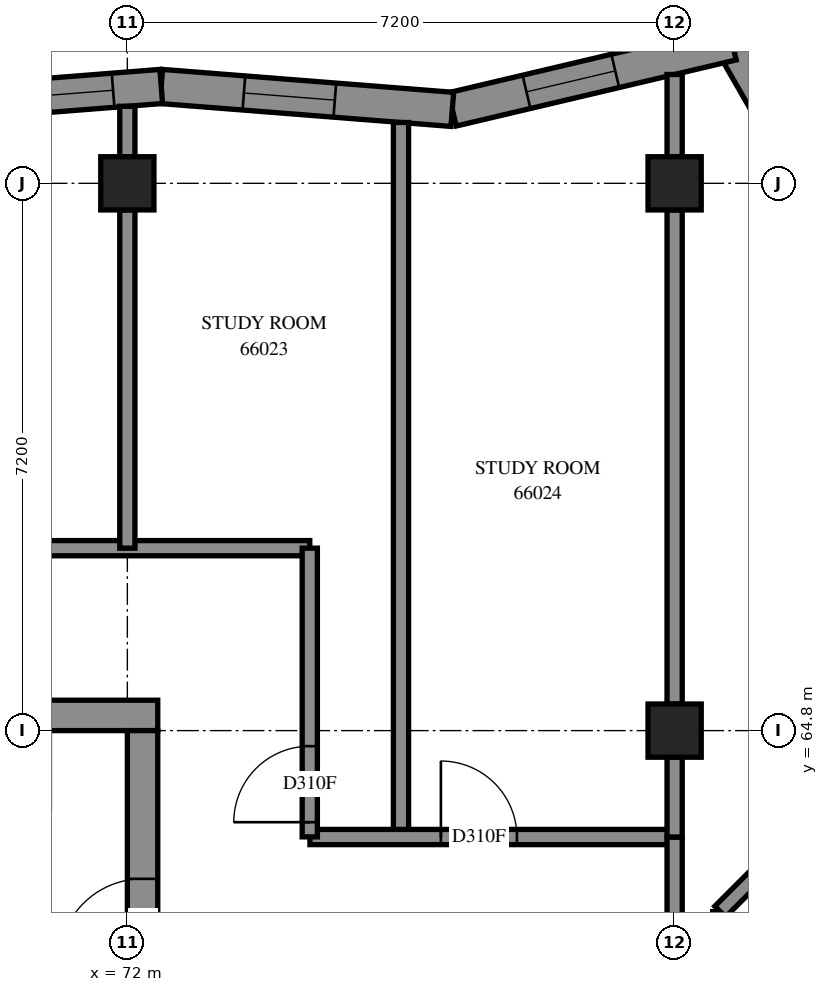
"""IFC4 building model, lengths in metres.
Left out: names, types, materials, properties, quantities, classifications, styles, units other than length and angle.
Written with IfcOpenShell. Run it as: python <this file> out.ifc"""

import sys

from ifc_helpers import new_model, si_unit, direction, frame, frame_2d, origin, origin_2d, place, context, subcontext, project, spatial, polyline, rectangle, outline, extrude, element, fill, save


model = new_model("IFC4")
c1 = context("Model", 3, precision=1e-05, world=origin(), true_north=direction((0.0, 1.0)))
c2 = subcontext(c1, "Body", "Model", "MODEL_VIEW")
j1 = project(units=[si_unit("LENGTHUNIT", "METRE"), si_unit("PLANEANGLEUNIT", "RADIAN")], contexts=[c1])
p1 = place(None, origin())
s1 = spatial("IfcSite", under=j1, at=p1, CompositionType="ELEMENT")
p2 = place(p1, origin())
s2 = spatial("IfcBuilding", under=s1, at=p2, CompositionType="ELEMENT")
p3 = place(p2, frame((0.0, 0.0, 243.8)))
s3 = spatial("IfcBuildingStorey", under=s2, at=p3, CompositionType="ELEMENT", Elevation=243.8)
for number, where, z_axis, x_axis in (
    (1, (72.0, 72.0, 0.0), (0.0, 0.0, 1.0), (1.0, 0.0, 0.0)),
    (2, (79.2, 64.8, 0.0), (0.0, 0.0, 1.0), (1.0, 0.0, 0.0)),
    (3, (79.2, 72.0, 0.0), (0.0, 0.0, 1.0), (1.0, 0.0, 0.0)),
):
    element("IfcColumn", number, at=place(p3, frame(where, z_axis=z_axis, x_axis=x_axis)), inside=s3, PredefinedType="COLUMN", context=c2, shape_type="SweptSolid", body=[
        extrude(rectangle(XDim=0.7, YDim=0.7, at=origin_2d()), origin(), (0.0, 0.0, 1.0), 3.1),
    ])
p4 = place(p3, frame((57.2, 65.0, -0.3), z_axis=(0.0, 0.0, 1.0), x_axis=(1.0, 0.0, 0.0)))
e4 = element("IfcWall", 4, at=p4, inside=s3, PredefinedType="SHEAR", context=c2, shape_type="SweptSolid", body=[
    extrude(rectangle(XDim=15.2, YDim=0.4, at=frame_2d((7.6, 0.0))), origin(), (0.0, 0.0, 1.0), 2.7),
])
p5 = place(p4, frame((10.4, 0.0, 0.3)))
e5 = element("IfcOpeningElement", 5, at=p5, cuts=e4, PredefinedType="OPENING", context=c2, shape_type="SweptSolid", body=[
    extrude(rectangle(XDim=0.8, YDim=2.1, at=frame_2d((0.4, 1.05))), frame((0.0, 0.21, 0.0), z_axis=(0.0, -1.0, 0.0), x_axis=(1.0, 0.0, 0.0)), (0.0, 0.0, 1.0), 0.42),
])
p6 = place(p3, frame((72.2, 50.4, -0.3), z_axis=(0.0, 0.0, 1.0), x_axis=(0.0, 1.0, 0.0)))
e6 = element("IfcWall", 6, at=p6, inside=s3, PredefinedType="SHEAR", context=c2, shape_type="SweptSolid", body=[
    extrude(rectangle(XDim=14.4, YDim=0.4, at=frame_2d((7.2, 0.0))), origin(), (0.0, 0.0, 1.0), 2.7),
])
p7 = place(p6, frame((4.55, 0.0, 0.3)))
e7 = element("IfcOpeningElement", 7, at=p7, cuts=e6, PredefinedType="OPENING", context=c2, shape_type="SweptSolid", body=[
    extrude(rectangle(XDim=1.1, YDim=2.1, at=frame_2d((0.55, 1.05))), frame((0.0, 0.21, 0.0), z_axis=(0.0, -1.0, 0.0), x_axis=(1.0, 0.0, 0.0)), (0.0, 0.0, 1.0), 0.42),
])
p8 = place(p6, frame((11.35, 0.0, 0.3)))
e8 = element("IfcOpeningElement", 8, at=p8, cuts=e6, PredefinedType="OPENING", context=c2, shape_type="SweptSolid", body=[
    extrude(rectangle(XDim=1.1, YDim=2.1, at=frame_2d((0.55, 1.05))), frame((0.0, 0.21, 0.0), z_axis=(0.0, -1.0, 0.0), x_axis=(1.0, 0.0, 0.0)), (0.0, 0.0, 1.0), 0.42),
])
p9 = place(p3, frame((81.611, 70.964, 0.0), z_axis=(0.0, 0.0, 1.0), x_axis=(-0.4979094823, 0.8672290052, 0.0)))
e9 = element("IfcWall", 9, at=p9, inside=s3, PredefinedType="SOLIDWALL", context=c2, shape_type="SweptSolid", body=[
    extrude(outline(polyline([(0.04, -0.225), (3.487, -0.225), (3.151, 0.225), (-0.04, 0.225), (0.04, -0.225)])), origin(), (0.0, 0.0, 1.0), 3.1),
])
p10 = place(p9, frame((0.762, 0.0, 0.45)))
e10 = element("IfcOpeningElement", 10, at=p10, cuts=e9, PredefinedType="OPENING", context=c2, shape_type="SweptSolid", body=[
    extrude(rectangle(XDim=1.2, YDim=2.55, at=frame_2d((0.6, 1.275))), frame((0.0, 0.235, 0.0), z_axis=(0.0, -1.0, 0.0), x_axis=(1.0, 0.0, 0.0)), (0.0, 0.0, 1.0), 0.47),
])
p11 = place(p3, frame((79.958, 73.843, 0.0), z_axis=(0.0, 0.0, 1.0), x_axis=(-0.973240833, -0.2297874693, 0.0)))
e11 = element("IfcWall", 11, at=p11, inside=s3, PredefinedType="SOLIDWALL", context=c2, shape_type="SweptSolid", body=[
    extrude(outline(polyline([(-0.168, -0.225), (3.749, -0.225), (3.82, 0.225), (0.168, 0.225), (-0.168, -0.225)])), origin(), (0.0, 0.0, 1.0), 3.1),
])
p12 = place(p11, frame((1.582, 0.0, 0.45)))
e12 = element("IfcOpeningElement", 12, at=p12, cuts=e11, PredefinedType="OPENING", context=c2, shape_type="SweptSolid", body=[
    extrude(rectangle(XDim=1.2, YDim=2.55, at=frame_2d((0.6, 1.275))), frame((0.0, 0.235, 0.0), z_axis=(0.0, -1.0, 0.0), x_axis=(1.0, 0.0, 0.0)), (0.0, 0.0, 1.0), 0.47),
])
p13 = place(p3, frame((76.275, 72.973, 0.0), z_axis=(0.0, 0.0, 1.0), x_axis=(-0.9969172534, 0.078460116, 0.0)))
e13 = element("IfcWall", 13, at=p13, inside=s3, PredefinedType="SOLIDWALL", context=c2, shape_type="SweptSolid", body=[
    extrude(outline(polyline([(0.035, -0.225), (3.859, -0.225), (3.824, 0.225), (-0.035, 0.225), (0.035, -0.225)])), origin(), (0.0, 0.0, 1.0), 3.1),
])
p14 = place(p13, frame((1.55, 0.0, 0.45)))
e14 = element("IfcOpeningElement", 14, at=p14, cuts=e13, PredefinedType="OPENING", context=c2, shape_type="SweptSolid", body=[
    extrude(rectangle(XDim=1.2, YDim=2.55, at=frame_2d((0.6, 1.275))), frame((0.0, 0.235, 0.0), z_axis=(0.0, -1.0, 0.0), x_axis=(1.0, 0.0, 0.0)), (0.0, 0.0, 1.0), 0.47),
])
p15 = place(p3, frame((72.446, 73.274, 0.0), z_axis=(0.0, 0.0, 1.0), x_axis=(-0.9969177178, -0.0784542156, 0.0)))
e15 = element("IfcWall", 15, at=p15, inside=s3, PredefinedType="SOLIDWALL", context=c2, shape_type="SweptSolid", body=[
    extrude(outline(polyline([(-0.018, -0.225), (3.806, -0.225), (3.842, 0.225), (0.018, 0.225), (-0.018, -0.225)])), origin(), (0.0, 0.0, 1.0), 3.1),
])
p16 = place(p15, frame((0.635, 0.0, 0.45)))
e16 = element("IfcOpeningElement", 16, at=p16, cuts=e15, PredefinedType="OPENING", context=c2, shape_type="SweptSolid", body=[
    extrude(rectangle(XDim=2.8, YDim=2.55, at=frame_2d((1.4, 1.275))), frame((0.0, 0.235, 0.0), z_axis=(0.0, -1.0, 0.0), x_axis=(1.0, 0.0, 0.0)), (0.0, 0.0, 1.0), 0.47),
])
p17 = place(p3, frame((55.2, 67.2, 0.0), z_axis=(0.0, 0.0, 1.0), x_axis=(1.0, 0.0, 0.0)))
e17 = element("IfcWall", 17, at=p17, inside=s3, PredefinedType="PARTITIONING", context=c2, shape_type="SweptSolid", body=[
    extrude(rectangle(XDim=19.2, YDim=0.2, at=frame_2d((9.6, 0.0))), origin(), (0.0, 0.0, 1.0), 3.1),
])
p18 = place(p17, frame((6.149, 0.0, 0.0)))
e18 = element("IfcOpeningElement", 18, at=p18, cuts=e17, PredefinedType="OPENING", context=c2, shape_type="SweptSolid", body=[
    extrude(rectangle(XDim=0.9, YDim=2.1, at=frame_2d((0.45, 1.05))), frame((0.0, 0.11, 0.0), z_axis=(0.0, -1.0, 0.0), x_axis=(1.0, 0.0, 0.0)), (0.0, 0.0, 1.0), 0.22),
])
p19 = place(p17, frame((13.499, 0.0, 0.0)))
e19 = element("IfcOpeningElement", 19, at=p19, cuts=e17, PredefinedType="OPENING", context=c2, shape_type="SweptSolid", body=[
    extrude(rectangle(XDim=0.9, YDim=2.1, at=frame_2d((0.45, 1.05))), frame((0.0, 0.11, 0.0), z_axis=(0.0, -1.0, 0.0), x_axis=(1.0, 0.0, 0.0)), (0.0, 0.0, 1.0), 0.22),
])
p20 = place(p3, frame((79.907, 55.739, 0.0), z_axis=(0.0, 0.0, 1.0), x_axis=(0.7071067812, 0.7071067812, 0.0)))
e20 = element("IfcWall", 20, at=p20, inside=s3, PredefinedType="PARTITIONING", context=c2, shape_type="SweptSolid", body=[
    extrude(rectangle(XDim=9.798, YDim=0.2, at=frame_2d((4.899, 0.0))), origin(), (0.0, 0.0, 1.0), 3.1),
])
p21 = place(p20, frame((0.616, 0.0, 0.0)))
e21 = element("IfcOpeningElement", 21, at=p21, cuts=e20, PredefinedType="OPENING", context=c2, shape_type="SweptSolid", body=[
    extrude(rectangle(XDim=1.0, YDim=2.1, at=frame_2d((0.5, 1.05))), frame((0.0, 0.11, 0.0), z_axis=(0.0, -1.0, 0.0), x_axis=(1.0, 0.0, 0.0)), (0.0, 0.0, 1.0), 0.22),
])
p22 = place(p3, frame((75.6, 63.4, 0.0), z_axis=(0.0, 0.0, 1.0), x_axis=(0.0, 1.0, 0.0)))
e22 = element("IfcWall", 22, at=p22, inside=s3, PredefinedType="PARTITIONING", context=c2, shape_type="SweptSolid", body=[
    extrude(rectangle(XDim=9.4, YDim=0.2, at=frame_2d((4.7, 0.0))), origin(), (0.0, 0.0, 1.0), 3.1),
])
p23 = place(p3, frame((79.2, 65.15, 0.0), z_axis=(0.0, 0.0, 1.0), x_axis=(0.0, 1.0, 0.0)))
e23 = element("IfcWall", 23, at=p23, inside=s3, PredefinedType="PARTITIONING", context=c2, shape_type="SweptSolid", body=[
    extrude(rectangle(XDim=6.5, YDim=0.2, at=frame_2d((3.25, 0.0))), origin(), (0.0, 0.0, 1.0), 3.1),
])
p24 = place(p3, frame((79.799, 62.419, 0.0), z_axis=(0.0, 0.0, 1.0), x_axis=(0.7071067812, 0.7071067812, 0.0)))
e24 = element("IfcWall", 24, at=p24, inside=s3, PredefinedType="PARTITIONING", context=c2, shape_type="SweptSolid", body=[
    extrude(rectangle(XDim=5.858, YDim=0.2, at=frame_2d((2.929, 0.0))), origin(), (0.0, 0.0, 1.0), 3.1),
])
p25 = place(p3, frame((74.402, 63.4, 0.0), z_axis=(0.0, 0.0, 1.0), x_axis=(1.0, 0.0, 0.0)))
e25 = element("IfcWall", 25, at=p25, inside=s3, PredefinedType="PARTITIONING", context=c2, shape_type="SweptSolid", body=[
    extrude(rectangle(XDim=4.798, YDim=0.2, at=frame_2d((2.399, 0.0))), origin(), (0.0, 0.0, 1.0), 3.1),
])
p26 = place(p25, frame((1.723, 0.0, 0.0)))
e26 = element("IfcOpeningElement", 26, at=p26, cuts=e25, PredefinedType="OPENING", context=c2, shape_type="SweptSolid", body=[
    extrude(rectangle(XDim=1.0, YDim=2.1, at=frame_2d((0.5, 1.05))), frame((0.0, 0.11, 0.0), z_axis=(0.0, -1.0, 0.0), x_axis=(1.0, 0.0, 0.0)), (0.0, 0.0, 1.0), 0.22),
])
p27 = place(p3, frame((72.0, 67.2, 0.0), z_axis=(0.0, 0.0, 1.0), x_axis=(0.0, 1.0, 0.0)))
e27 = element("IfcWall", 27, at=p27, inside=s3, PredefinedType="PARTITIONING", context=c2, shape_type="SweptSolid", body=[
    extrude(rectangle(XDim=4.45, YDim=0.2, at=frame_2d((2.225, 0.0))), origin(), (0.0, 0.0, 1.0), 3.1),
])
p28 = place(p3, frame((74.4, 63.402, 0.0), z_axis=(0.0, 0.0, 1.0), x_axis=(0.0, 1.0, 0.0)))
e28 = element("IfcWall", 28, at=p28, inside=s3, PredefinedType="PARTITIONING", context=c2, shape_type="SweptSolid", body=[
    extrude(rectangle(XDim=3.798, YDim=0.2, at=frame_2d((1.899, 0.0))), origin(), (0.0, 0.0, 1.0), 3.1),
])
p29 = place(p28, frame((0.193, 0.0, 0.0)))
e29 = element("IfcOpeningElement", 29, at=p29, cuts=e28, PredefinedType="OPENING", context=c2, shape_type="SweptSolid", body=[
    extrude(rectangle(XDim=1.0, YDim=2.1, at=frame_2d((0.5, 1.05))), frame((0.0, 0.11, 0.0), z_axis=(0.0, -1.0, 0.0), x_axis=(1.0, 0.0, 0.0)), (0.0, 0.0, 1.0), 0.22),
])
p30 = place(p3, frame((79.2, 61.4, 0.0), z_axis=(0.0, 0.0, 1.0), x_axis=(0.0, 1.0, 0.0)))
e30 = element("IfcWall", 30, at=p30, inside=s3, PredefinedType="PARTITIONING", context=c2, shape_type="SweptSolid", body=[
    extrude(rectangle(XDim=2.0, YDim=0.2, at=frame_2d((1.0, 0.0))), origin(), (0.0, 0.0, 1.0), 3.1),
])
p31 = place(p3, frame((79.2, 63.4, 0.0), z_axis=(0.0, 0.0, 1.0), x_axis=(0.0, 1.0, 0.0)))
e31 = element("IfcWall", 31, at=p31, inside=s3, PredefinedType="PARTITIONING", context=c2, shape_type="SweptSolid", body=[
    extrude(rectangle(XDim=1.05, YDim=0.2, at=frame_2d((0.525, 0.0))), origin(), (0.0, 0.0, 1.0), 3.1),
])
p32 = place(p3, frame((79.2, 72.35, 0.0), z_axis=(0.0, 0.0, 1.0), x_axis=(0.0, 1.0, 0.0)))
e32 = element("IfcWall", 32, at=p32, inside=s3, PredefinedType="PARTITIONING", context=c2, shape_type="SweptSolid", body=[
    extrude(rectangle(XDim=1.082, YDim=0.2, at=frame_2d((0.541, 0.0))), origin(), (0.0, 0.0, 1.0), 3.1),
])
p33 = place(p3, frame((72.0, 72.35, 0.0), z_axis=(0.0, 0.0, 1.0), x_axis=(0.0, 1.0, 0.0)))
e33 = element("IfcWall", 33, at=p33, inside=s3, PredefinedType="PARTITIONING", context=c2, shape_type="SweptSolid", body=[
    extrude(rectangle(XDim=0.663, YDim=0.2, at=frame_2d((0.332, 0.0))), origin(), (0.0, 0.0, 1.0), 3.1),
])
p34 = place(p12, origin())
e34 = element("IfcWindow", 34, at=p34, inside=s3, PartitioningType="SINGLE_PANEL", PredefinedType="WINDOW", context=c2, shape_type="SweptSolid", body=[
    extrude(rectangle(XDim=1.2, YDim=2.55, at=frame_2d((0.6, 1.275))), frame((0.0, 0.205, 0.0), z_axis=(0.0, -1.0, 0.0), x_axis=(1.0, 0.0, 0.0)), (0.0, 0.0, 1.0), 0.06),
])
fill(e12, e34)
p35 = place(p14, origin())
e35 = element("IfcWindow", 35, at=p35, inside=s3, PartitioningType="SINGLE_PANEL", PredefinedType="WINDOW", context=c2, shape_type="SweptSolid", body=[
    extrude(rectangle(XDim=1.2, YDim=2.55, at=frame_2d((0.6, 1.275))), frame((0.0, 0.205, 0.0), z_axis=(0.0, -1.0, 0.0), x_axis=(1.0, 0.0, 0.0)), (0.0, 0.0, 1.0), 0.06),
])
fill(e14, e35)
p36 = place(p16, origin())
e36 = element("IfcWindow", 36, at=p36, inside=s3, PartitioningType="SINGLE_PANEL", PredefinedType="WINDOW", context=c2, shape_type="SweptSolid", body=[
    extrude(rectangle(XDim=2.8, YDim=2.55, at=frame_2d((1.4, 1.275))), frame((0.0, 0.205, 0.0), z_axis=(0.0, -1.0, 0.0), x_axis=(1.0, 0.0, 0.0)), (0.0, 0.0, 1.0), 0.06),
])
fill(e16, e36)
p37 = place(p8, origin())
e37 = element("IfcDoor", 37, at=p37, inside=s3, OperationType="SINGLE_SWING_RIGHT", PredefinedType="DOOR", context=c2, shape_type="SweptSolid", body=[
    extrude(rectangle(XDim=1.1, YDim=2.1, at=frame_2d((0.55, 1.05))), frame((0.0, 0.025, 0.0), z_axis=(0.0, -1.0, 0.0), x_axis=(1.0, 0.0, 0.0)), (0.0, 0.0, 1.0), 0.05),
])
fill(e8, e37)
p38 = place(p29, origin())
e38 = element("IfcDoor", 38, at=p38, inside=s3, OperationType="SINGLE_SWING_RIGHT", PredefinedType="DOOR", context=c2, shape_type="SweptSolid", body=[
    extrude(rectangle(XDim=1.0, YDim=2.1, at=frame_2d((0.5, 1.05))), frame((0.0, 0.025, 0.0), z_axis=(0.0, -1.0, 0.0), x_axis=(1.0, 0.0, 0.0)), (0.0, 0.0, 1.0), 0.05),
])
fill(e29, e38)
p39 = place(p26, origin())
e39 = element("IfcDoor", 39, at=p39, inside=s3, OperationType="SINGLE_SWING_LEFT", PredefinedType="DOOR", context=c2, shape_type="SweptSolid", body=[
    extrude(rectangle(XDim=1.0, YDim=2.1, at=frame_2d((0.5, 1.05))), frame((0.0, 0.025, 0.0), z_axis=(0.0, -1.0, 0.0), x_axis=(1.0, 0.0, 0.0)), (0.0, 0.0, 1.0), 0.05),
])
fill(e26, e39)
save(model, sys.argv[1])
